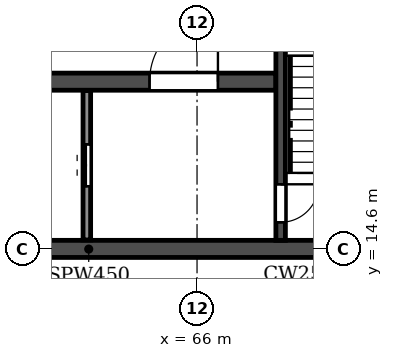
"""IFC4 building model, lengths in metres.
Left out: names, types, materials, properties, quantities, classifications, styles, units other than length and angle.
Written with IfcOpenShell. Run it as: python <this file> out.ifc"""

import sys

from ifc_helpers import new_model, si_unit, direction, frame, frame_2d, origin, place, context, subcontext, project, spatial, rectangle, extrude, element, fill, save


model = new_model("IFC4")
c1 = context("Model", 3, precision=1e-05, world=origin(), true_north=direction((0.0, 1.0)))
c2 = subcontext(c1, "Body", "Model", "MODEL_VIEW")
j1 = project(units=[si_unit("LENGTHUNIT", "METRE"), si_unit("PLANEANGLEUNIT", "RADIAN")], contexts=[c1])
p1 = place(None, origin())
s1 = spatial("IfcSite", under=j1, at=p1, CompositionType="ELEMENT")
p2 = place(p1, origin())
s2 = spatial("IfcBuilding", under=s1, at=p2, CompositionType="ELEMENT")
p3 = place(p2, frame((0.0, 0.0, 155.4)))
s3 = spatial("IfcBuildingStorey", under=s2, at=p3, CompositionType="ELEMENT", Elevation=155.4)
p4 = place(p3, frame((12.2, 14.6, 0.0), z_axis=(0.0, 0.0, 1.0), x_axis=(1.0, 0.0, 0.0)))
e1 = element("IfcWall", 1, at=p4, inside=s3, PredefinedType="SOLIDWALL", context=c2, shape_type="SweptSolid", body=[
    extrude(rectangle(XDim=77.6, YDim=0.45, at=frame_2d((38.8, 0.0))), origin(), (0.0, 0.0, 1.0), 3.0),
])
p5 = place(p4, frame((2.3, 0.0, 0.0)))
e2 = element("IfcOpeningElement", 2, at=p5, cuts=e1, PredefinedType="OPENING", context=c2, shape_type="SweptSolid", body=[
    extrude(rectangle(XDim=1.0, YDim=2.1, at=frame_2d((0.5, 1.05))), frame((0.0, 0.235, 0.0), z_axis=(0.0, -1.0, 0.0), x_axis=(1.0, 0.0, 0.0)), (0.0, 0.0, 1.0), 0.47),
])
p6 = place(p4, frame((6.7, 0.0, 0.0)))
e3 = element("IfcOpeningElement", 3, at=p6, cuts=e1, PredefinedType="OPENING", context=c2, shape_type="SweptSolid", body=[
    extrude(rectangle(XDim=1.0, YDim=2.1, at=frame_2d((0.5, 1.05))), frame((0.0, 0.235, 0.0), z_axis=(0.0, -1.0, 0.0), x_axis=(1.0, 0.0, 0.0)), (0.0, 0.0, 1.0), 0.47),
])
p7 = place(p4, frame((14.6, 0.0, 0.0)))
e4 = element("IfcOpeningElement", 4, at=p7, cuts=e1, PredefinedType="OPENING", context=c2, shape_type="SweptSolid", body=[
    extrude(rectangle(XDim=1.0, YDim=2.1, at=frame_2d((0.5, 1.05))), frame((0.0, 0.235, 0.0), z_axis=(0.0, -1.0, 0.0), x_axis=(1.0, 0.0, 0.0)), (0.0, 0.0, 1.0), 0.47),
])
p8 = place(p4, frame((19.2, 0.0, 0.0)))
e5 = element("IfcOpeningElement", 5, at=p8, cuts=e1, PredefinedType="OPENING", context=c2, shape_type="SweptSolid", body=[
    extrude(rectangle(XDim=1.0, YDim=2.1, at=frame_2d((0.5, 1.05))), frame((0.0, 0.235, 0.0), z_axis=(0.0, -1.0, 0.0), x_axis=(1.0, 0.0, 0.0)), (0.0, 0.0, 1.0), 0.47),
])
p9 = place(p4, frame((30.5, 0.0, 0.0)))
e6 = element("IfcOpeningElement", 6, at=p9, cuts=e1, PredefinedType="OPENING", context=c2, shape_type="SweptSolid", body=[
    extrude(rectangle(XDim=1.0, YDim=2.1, at=frame_2d((0.5, 1.05))), frame((0.0, 0.235, 0.0), z_axis=(0.0, -1.0, 0.0), x_axis=(1.0, 0.0, 0.0)), (0.0, 0.0, 1.0), 0.47),
])
p10 = place(p4, frame((34.15, 0.0, 0.0)))
e7 = element("IfcOpeningElement", 7, at=p10, cuts=e1, PredefinedType="OPENING", context=c2, shape_type="SweptSolid", body=[
    extrude(rectangle(XDim=1.5, YDim=2.1, at=frame_2d((0.75, 1.05))), frame((0.0, 0.235, 0.0), z_axis=(0.0, -1.0, 0.0), x_axis=(1.0, 0.0, 0.0)), (0.0, 0.0, 1.0), 0.47),
])
p11 = place(p4, frame((38.3, 0.0, 0.0)))
e8 = element("IfcOpeningElement", 8, at=p11, cuts=e1, PredefinedType="OPENING", context=c2, shape_type="SweptSolid", body=[
    extrude(rectangle(XDim=1.0, YDim=2.1, at=frame_2d((0.5, 1.05))), frame((0.0, 0.235, 0.0), z_axis=(0.0, -1.0, 0.0), x_axis=(1.0, 0.0, 0.0)), (0.0, 0.0, 1.0), 0.47),
])
p12 = place(p4, frame((43.5, 0.0, 0.0)))
e9 = element("IfcOpeningElement", 9, at=p12, cuts=e1, PredefinedType="OPENING", context=c2, shape_type="SweptSolid", body=[
    extrude(rectangle(XDim=1.0, YDim=2.1, at=frame_2d((0.5, 1.05))), frame((0.0, 0.235, 0.0), z_axis=(0.0, -1.0, 0.0), x_axis=(1.0, 0.0, 0.0)), (0.0, 0.0, 1.0), 0.47),
])
p13 = place(p4, frame((57.4, 0.0, 0.0)))
e10 = element("IfcOpeningElement", 10, at=p13, cuts=e1, PredefinedType="OPENING", context=c2, shape_type="SweptSolid", body=[
    extrude(rectangle(XDim=1.0, YDim=2.1, at=frame_2d((0.5, 1.05))), frame((0.0, 0.235, 0.0), z_axis=(0.0, -1.0, 0.0), x_axis=(1.0, 0.0, 0.0)), (0.0, 0.0, 1.0), 0.47),
])
p14 = place(p4, frame((62.0, 0.0, 0.0)))
e11 = element("IfcOpeningElement", 11, at=p14, cuts=e1, PredefinedType="OPENING", context=c2, shape_type="SweptSolid", body=[
    extrude(rectangle(XDim=1.0, YDim=2.1, at=frame_2d((0.5, 1.05))), frame((0.0, 0.235, 0.0), z_axis=(0.0, -1.0, 0.0), x_axis=(1.0, 0.0, 0.0)), (0.0, 0.0, 1.0), 0.47),
])
p15 = place(p4, frame((69.9, 0.0, 0.0)))
e12 = element("IfcOpeningElement", 12, at=p15, cuts=e1, PredefinedType="OPENING", context=c2, shape_type="SweptSolid", body=[
    extrude(rectangle(XDim=1.0, YDim=2.1, at=frame_2d((0.5, 1.05))), frame((0.0, 0.235, 0.0), z_axis=(0.0, -1.0, 0.0), x_axis=(1.0, 0.0, 0.0)), (0.0, 0.0, 1.0), 0.47),
])
p16 = place(p4, frame((74.3, 0.0, 0.0)))
e13 = element("IfcOpeningElement", 13, at=p16, cuts=e1, PredefinedType="OPENING", context=c2, shape_type="SweptSolid", body=[
    extrude(rectangle(XDim=1.0, YDim=2.1, at=frame_2d((0.5, 1.05))), frame((0.0, 0.235, 0.0), z_axis=(0.0, -1.0, 0.0), x_axis=(1.0, 0.0, 0.0)), (0.0, 0.0, 1.0), 0.47),
])
p17 = place(p3, frame((33.925, 19.0, 0.0), z_axis=(0.0, 0.0, 1.0), x_axis=(1.0, 0.0, 0.0)))
e14 = element("IfcWall", 14, at=p17, inside=s3, PredefinedType="SOLIDWALL", context=c2, shape_type="SweptSolid", body=[
    extrude(rectangle(XDim=34.15, YDim=0.45, at=frame_2d((17.075, 0.0))), origin(), (0.0, 0.0, 1.0), 3.0),
])
p18 = place(p17, frame((16.175, 0.0, 0.0)))
e15 = element("IfcOpeningElement", 15, at=p18, cuts=e14, PredefinedType="OPENING", context=c2, shape_type="SweptSolid", body=[
    extrude(rectangle(XDim=1.8, YDim=2.1, at=frame_2d((0.9, 1.05))), frame((0.0, 0.235, 0.0), z_axis=(0.0, -1.0, 0.0), x_axis=(1.0, 0.0, 0.0)), (0.0, 0.0, 1.0), 0.47),
])
p19 = place(p17, frame((1.525, 0.0, 0.0)))
e16 = element("IfcOpeningElement", 16, at=p19, cuts=e14, PredefinedType="OPENING", context=c2, shape_type="SweptSolid", body=[
    extrude(rectangle(XDim=1.8, YDim=2.1, at=frame_2d((0.9, 1.05))), frame((0.0, 0.235, 0.0), z_axis=(0.0, -1.0, 0.0), x_axis=(1.0, 0.0, 0.0)), (0.0, 0.0, 1.0), 0.47),
])
p20 = place(p17, frame((30.825, 0.0, 0.0)))
e17 = element("IfcOpeningElement", 17, at=p20, cuts=e14, PredefinedType="OPENING", context=c2, shape_type="SweptSolid", body=[
    extrude(rectangle(XDim=1.8, YDim=2.1, at=frame_2d((0.9, 1.05))), frame((0.0, 0.235, 0.0), z_axis=(0.0, -1.0, 0.0), x_axis=(1.0, 0.0, 0.0)), (0.0, 0.0, 1.0), 0.47),
])
p21 = place(p3, frame((68.2, 14.825, 0.0), z_axis=(0.0, 0.0, 1.0), x_axis=(0.0, 1.0, 0.0)))
e18 = element("IfcWall", 18, at=p21, inside=s3, PredefinedType="SOLIDWALL", context=c2, shape_type="SweptSolid", body=[
    extrude(rectangle(XDim=7.65, YDim=0.25, at=frame_2d((3.825, 0.0))), origin(), (0.0, 0.0, 1.0), 3.0),
])
p22 = place(p21, frame((0.475, 0.0, 0.0)))
e19 = element("IfcOpeningElement", 19, at=p22, cuts=e18, PredefinedType="OPENING", context=c2, shape_type="SweptSolid", body=[
    extrude(rectangle(XDim=1.0, YDim=2.1, at=frame_2d((0.5, 1.05))), frame((0.0, 0.135, 0.0), z_axis=(0.0, -1.0, 0.0), x_axis=(1.0, 0.0, 0.0)), (0.0, 0.0, 1.0), 0.27),
])
p23 = place(p3, frame((63.1, 14.835, 0.0), z_axis=(0.0, 0.0, 1.0), x_axis=(0.0, 1.0, 0.0)))
e20 = element("IfcWall", 20, at=p23, inside=s3, PredefinedType="PARTITIONING", context=c2, shape_type="SweptSolid", body=[
    extrude(rectangle(XDim=3.93, YDim=0.2, at=frame_2d((1.965, 0.0))), origin(), (0.0, 0.0, 1.0), 3.0),
])
p24 = place(p23, frame((1.415, 0.0, 0.0)))
e21 = element("IfcOpeningElement", 21, at=p24, cuts=e20, PredefinedType="OPENING", context=c2, shape_type="SweptSolid", body=[
    extrude(rectangle(XDim=1.1, YDim=2.1, at=frame_2d((0.55, 1.05))), frame((0.0, 0.11, 0.0), z_axis=(0.0, -1.0, 0.0), x_axis=(1.0, 0.0, 0.0)), (0.0, 0.0, 1.0), 0.22),
])
p25 = place(p24, origin())
e22 = element("IfcDoor", 22, at=p25, inside=s3, OperationType="DOUBLE_DOOR_SLIDING", PredefinedType="DOOR", context=c2, shape_type="SweptSolid", body=[
    extrude(rectangle(XDim=1.1, YDim=2.1, at=frame_2d((0.55, 1.05))), frame((0.0, 0.025, 0.0), z_axis=(0.0, -1.0, 0.0), x_axis=(1.0, 0.0, 0.0)), (0.0, 0.0, 1.0), 0.05),
])
fill(e21, e22)
p26 = place(p22, frame((1.0, 0.0, 0.0), z_axis=(0.0, 0.0, 1.0), x_axis=(-1.0, 0.0, 0.0)))
e23 = element("IfcDoor", 23, at=p26, inside=s3, OperationType="SINGLE_SWING_LEFT", PredefinedType="DOOR", context=c2, shape_type="SweptSolid", body=[
    extrude(rectangle(XDim=1.0, YDim=2.1, at=frame_2d((0.5, 1.05))), frame((0.0, 0.025, 0.0), z_axis=(0.0, -1.0, 0.0), x_axis=(1.0, 0.0, 0.0)), (0.0, 0.0, 1.0), 0.05),
])
fill(e19, e23)
p27 = place(p20, origin())
e24 = element("IfcDoor", 24, at=p27, inside=s3, OperationType="DOUBLE_DOOR_SINGLE_SWING", PredefinedType="DOOR", context=c2, shape_type="SweptSolid", body=[
    extrude(rectangle(XDim=1.8, YDim=2.1, at=frame_2d((0.9, 1.05))), frame((0.0, 0.025, 0.0), z_axis=(0.0, -1.0, 0.0), x_axis=(1.0, 0.0, 0.0)), (0.0, 0.0, 1.0), 0.05),
])
fill(e17, e24)
save(model, sys.argv[1])
